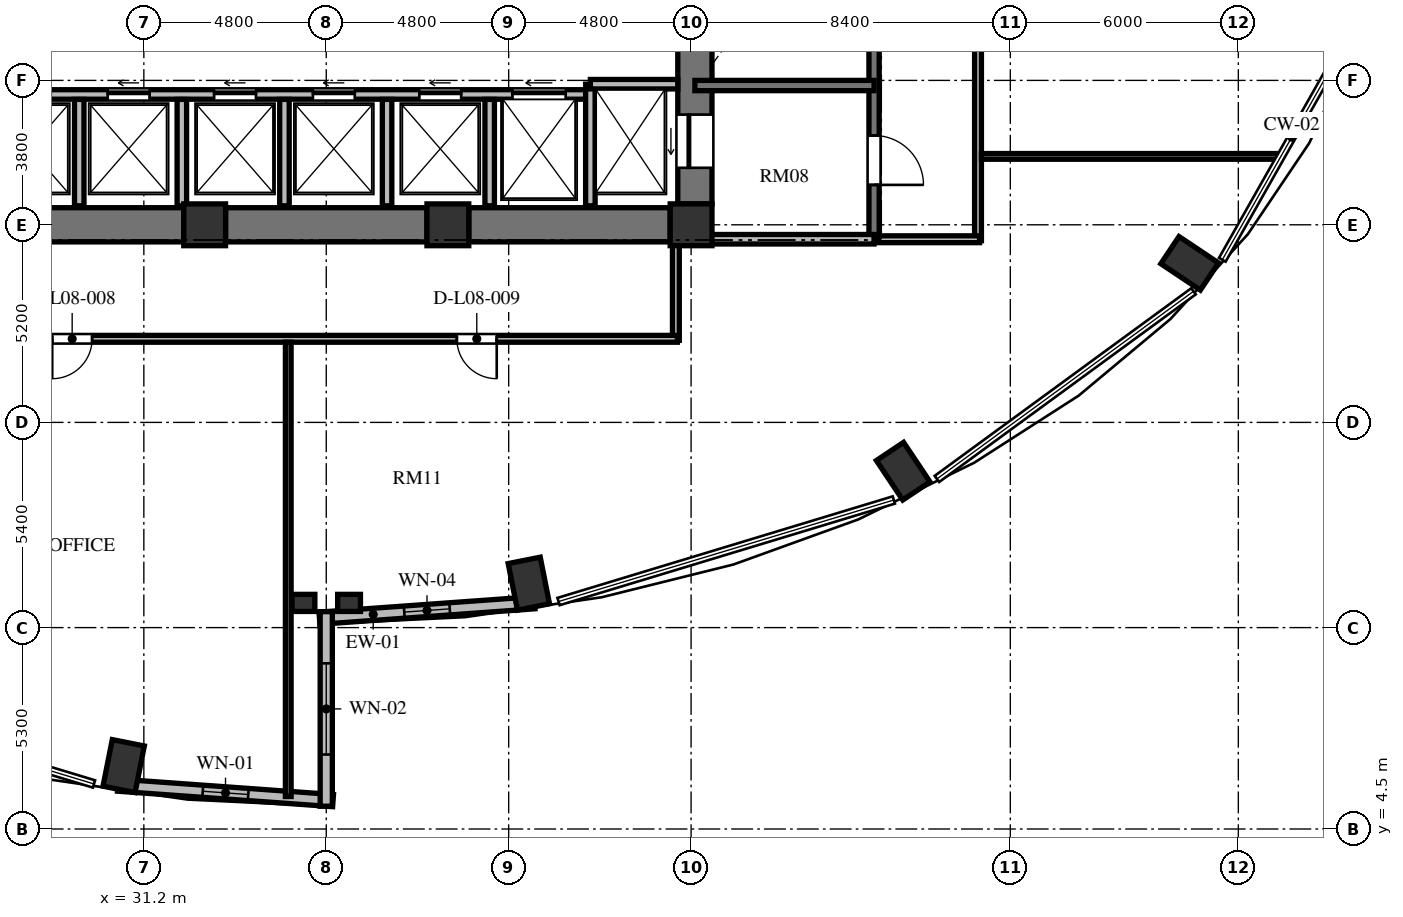
"""IFC4 building model, lengths in metres.
Left out: names, types, materials, properties, quantities, classifications, styles, units other than length and angle.
Written with IfcOpenShell. Run it as: python <this file> out.ifc"""

import sys

from ifc_helpers import new_model, si_unit, direction, frame, frame_2d, origin, origin_2d, place, context, subcontext, project, spatial, rectangle, extrude, element, fill, save


model = new_model("IFC4")
c1 = context("Model", 3, precision=1e-05, world=origin(), true_north=direction((0.0, 1.0)))
c2 = subcontext(c1, "Body", "Model", "MODEL_VIEW")
j1 = project(units=[si_unit("LENGTHUNIT", "METRE"), si_unit("PLANEANGLEUNIT", "RADIAN")], contexts=[c1])
p1 = place(None, origin())
s1 = spatial("IfcSite", under=j1, at=p1, CompositionType="ELEMENT")
p2 = place(p1, origin())
s2 = spatial("IfcBuilding", under=s1, at=p2, CompositionType="ELEMENT")
p3 = place(p2, frame((0.0, 0.0, 36.144)))
s3 = spatial("IfcBuildingStorey", under=s2, at=p3, CompositionType="ELEMENT", Elevation=36.144)
for number, where, z_axis, x_axis in (
    (1, (41.331, 10.956, 0.0), (0.0, 0.0, 1.0), (0.195, -0.981, 0.0)),
    (2, (51.181, 13.916, 0.0), (0.0, 0.0, 1.0), (0.556, -0.831, 0.0)),
    (3, (58.72, 19.386, 0.0), (0.0, 0.0, 1.0), (0.831, -0.556, 0.0)),
    (4, (30.669, 6.156, 0.0), (0.0, 0.0, 1.0), (-0.195, -0.981, 0.0)),
):
    element("IfcColumn", number, at=place(p3, frame(where, z_axis=z_axis, x_axis=x_axis)), inside=s3, PredefinedType="COLUMN", context=c2, shape_type="SweptSolid", body=[
        extrude(rectangle(XDim=1.25, YDim=0.86, at=origin_2d()), origin(), (0.0, 0.0, 1.0), 3.648),
    ])
for number, where, z_axis, x_axis in (
    (5, (32.8, 20.4, 0.0), (0.0, 0.0, 1.0), (1.0, 0.0, 0.0)),
    (6, (39.2, 20.4, 0.0), (0.0, 0.0, 1.0), (1.0, 0.0, 0.0)),
    (7, (45.6, 20.4, 0.0), (0.0, 0.0, 1.0), (1.0, 0.0, 0.0)),
):
    element("IfcColumn", number, at=place(p3, frame(where, z_axis=z_axis, x_axis=x_axis)), inside=s3, PredefinedType="COLUMN", context=c2, shape_type="SweptSolid", body=[
        extrude(rectangle(XDim=1.1, YDim=1.1, at=origin_2d()), origin(), (0.0, 0.0, 1.0), 3.648),
    ])
for number, where, z_axis, x_axis in (
    (8, (35.4, 10.45, 0.0), (0.0, 0.0, 1.0), (1.0, 0.0, 0.0)),
    (9, (36.6, 10.45, 0.0), (0.0, 0.0, 1.0), (1.0, 0.0, 0.0)),
):
    element("IfcColumn", number, at=place(p3, frame(where, z_axis=z_axis, x_axis=x_axis)), inside=s3, PredefinedType="PILASTER", context=c2, shape_type="SweptSolid", body=[
        extrude(rectangle(XDim=0.6, YDim=0.45, at=origin_2d()), origin(), (0.0, 0.0, 1.0), 3.648),
    ])
p4 = place(p3, frame((45.7, 20.95, 0.0), z_axis=(0.0, 0.0, 1.0), x_axis=(0.0, 1.0, 0.0)))
e10 = element("IfcWall", 10, at=p4, inside=s3, PredefinedType="SHEAR", context=c2, shape_type="SweptSolid", body=[
    extrude(rectangle(XDim=14.1, YDim=0.9, at=frame_2d((7.05, 0.0))), origin(), (0.0, 0.0, 1.0), 3.648),
])
p5 = place(p4, frame((11.75, 0.0, 0.0)))
e11 = element("IfcOpeningElement", 11, at=p5, cuts=e10, PredefinedType="OPENING", context=c2, shape_type="SweptSolid", body=[
    extrude(rectangle(XDim=1.4, YDim=2.3, at=frame_2d((0.7, 1.15))), frame((0.0, 0.46, 0.0), z_axis=(0.0, -1.0, 0.0), x_axis=(1.0, 0.0, 0.0)), (0.0, 0.0, 1.0), 0.92),
])
p6 = place(p4, frame((0.95, 0.0, 0.0)))
e12 = element("IfcOpeningElement", 12, at=p6, cuts=e10, PredefinedType="OPENING", context=c2, shape_type="SweptSolid", body=[
    extrude(rectangle(XDim=1.4, YDim=2.3, at=frame_2d((0.7, 1.15))), frame((0.0, 0.46, 0.0), z_axis=(0.0, -1.0, 0.0), x_axis=(1.0, 0.0, 0.0)), (0.0, 0.0, 1.0), 0.92),
])
p7 = place(p3, frame((26.95, 20.4, 0.0), z_axis=(0.0, 0.0, 1.0), x_axis=(1.0, 0.0, 0.0)))
e13 = element("IfcWall", 13, at=p7, inside=s3, PredefinedType="SHEAR", context=c2, shape_type="SweptSolid", body=[
    extrude(rectangle(XDim=5.3, YDim=0.9, at=frame_2d((2.65, 0.0))), origin(), (0.0, 0.0, 1.0), 3.648),
])
p8 = place(p3, frame((33.35, 20.4, 0.0), z_axis=(0.0, 0.0, 1.0), x_axis=(1.0, 0.0, 0.0)))
e14 = element("IfcWall", 14, at=p8, inside=s3, PredefinedType="SHEAR", context=c2, shape_type="SweptSolid", body=[
    extrude(rectangle(XDim=5.3, YDim=0.9, at=frame_2d((2.65, 0.0))), origin(), (0.0, 0.0, 1.0), 3.648),
])
p9 = place(p3, frame((39.75, 20.4, 0.0), z_axis=(0.0, 0.0, 1.0), x_axis=(1.0, 0.0, 0.0)))
e15 = element("IfcWall", 15, at=p9, inside=s3, PredefinedType="SHEAR", context=c2, shape_type="SweptSolid", body=[
    extrude(rectangle(XDim=5.3, YDim=0.9, at=frame_2d((2.65, 0.0))), origin(), (0.0, 0.0, 1.0), 3.648),
])
p10 = place(p3, frame((35.821, 10.047, 0.0), z_axis=(0.0, 0.0, 1.0), x_axis=(0.997422321809, 0.071754525696, 0.0)))
e16 = element("IfcWall", 16, at=p10, inside=s3, PredefinedType="SOLIDWALL", context=c2, shape_type="SweptSolid", body=[
    extrude(rectangle(XDim=5.675, YDim=0.32, at=frame_2d((2.838, 0.0))), origin(), (0.0, 0.0, 1.0), 3.428),
])
p11 = place(p10, frame((2.238, 0.0, 0.85)))
e17 = element("IfcOpeningElement", 17, at=p11, cuts=e16, PredefinedType="OPENING", context=c2, shape_type="SweptSolid", body=[
    extrude(rectangle(XDim=1.2, YDim=1.8, at=frame_2d((0.6, 0.9))), frame((0.0, 0.17, 0.0), z_axis=(0.0, -1.0, 0.0), x_axis=(1.0, 0.0, 0.0)), (0.0, 0.0, 1.0), 0.34),
])
p12 = place(p3, frame((30.519, 5.654, 0.0), z_axis=(0.0, 0.0, 1.0), x_axis=(0.997421878774, -0.071760683825, 0.0)))
e18 = element("IfcWall", 18, at=p12, inside=s3, PredefinedType="SOLIDWALL", context=c2, shape_type="SweptSolid", body=[
    extrude(rectangle(XDim=5.675, YDim=0.32, at=frame_2d((2.837, 0.0))), origin(), (0.0, 0.0, 1.0), 3.428),
])
p13 = place(p12, frame((2.237, 0.0, 0.85)))
e19 = element("IfcOpeningElement", 19, at=p13, cuts=e18, PredefinedType="OPENING", context=c2, shape_type="SweptSolid", body=[
    extrude(rectangle(XDim=1.2, YDim=2.2, at=frame_2d((0.6, 1.1))), frame((0.0, 0.17, 0.0), z_axis=(0.0, -1.0, 0.0), x_axis=(1.0, 0.0, 0.0)), (0.0, 0.0, 1.0), 0.34),
])
p14 = place(p3, frame((36.0, 5.1, 0.0), z_axis=(0.0, 0.0, 1.0), x_axis=(0.0, 1.0, 0.0)))
e20 = element("IfcWall", 20, at=p14, inside=s3, PredefinedType="SOLIDWALL", context=c2, shape_type="SweptSolid", body=[
    extrude(rectangle(XDim=5.12, YDim=0.32, at=frame_2d((2.56, 0.0))), origin(), (0.0, 0.0, 1.0), 3.428),
])
p15 = place(p14, frame((1.36, 0.0, 0.84)))
e21 = element("IfcOpeningElement", 21, at=p15, cuts=e20, PredefinedType="OPENING", context=c2, shape_type="SweptSolid", body=[
    extrude(rectangle(XDim=2.4, YDim=2.04, at=frame_2d((1.2, 1.02))), frame((0.0, 0.17, 0.0), z_axis=(0.0, -1.0, 0.0), x_axis=(1.0, 0.0, 0.0)), (0.0, 0.0, 1.0), 0.34),
])
p16 = place(p3, frame((26.75, 23.83, 0.0), z_axis=(0.0, 0.0, 1.0), x_axis=(1.0, 0.0, 0.0)))
e22 = element("IfcWall", 22, at=p16, inside=s3, PredefinedType="SOLIDWALL", context=c2, shape_type="SweptSolid", body=[
    extrude(rectangle(XDim=16.2, YDim=0.25, at=frame_2d((8.1, 0.0))), origin(), (0.0, 0.0, 1.0), 3.428),
])
p17 = place(p16, frame((0.9, 0.0, 0.0)))
e23 = element("IfcOpeningElement", 23, at=p17, cuts=e22, PredefinedType="OPENING", context=c2, shape_type="SweptSolid", body=[
    extrude(rectangle(XDim=1.1, YDim=2.2, at=frame_2d((0.55, 1.1))), frame((0.0, 0.135, 0.0), z_axis=(0.0, -1.0, 0.0), x_axis=(1.0, 0.0, 0.0)), (0.0, 0.0, 1.0), 0.27),
])
p18 = place(p16, frame((3.5, 0.0, 0.0)))
e24 = element("IfcOpeningElement", 24, at=p18, cuts=e22, PredefinedType="OPENING", context=c2, shape_type="SweptSolid", body=[
    extrude(rectangle(XDim=1.1, YDim=2.2, at=frame_2d((0.55, 1.1))), frame((0.0, 0.135, 0.0), z_axis=(0.0, -1.0, 0.0), x_axis=(1.0, 0.0, 0.0)), (0.0, 0.0, 1.0), 0.27),
])
p19 = place(p16, frame((6.3, 0.0, 0.0)))
e25 = element("IfcOpeningElement", 25, at=p19, cuts=e22, PredefinedType="OPENING", context=c2, shape_type="SweptSolid", body=[
    extrude(rectangle(XDim=1.1, YDim=2.2, at=frame_2d((0.55, 1.1))), frame((0.0, 0.135, 0.0), z_axis=(0.0, -1.0, 0.0), x_axis=(1.0, 0.0, 0.0)), (0.0, 0.0, 1.0), 0.27),
])
p20 = place(p16, frame((8.9, 0.0, 0.0)))
e26 = element("IfcOpeningElement", 26, at=p20, cuts=e22, PredefinedType="OPENING", context=c2, shape_type="SweptSolid", body=[
    extrude(rectangle(XDim=1.1, YDim=2.2, at=frame_2d((0.55, 1.1))), frame((0.0, 0.135, 0.0), z_axis=(0.0, -1.0, 0.0), x_axis=(1.0, 0.0, 0.0)), (0.0, 0.0, 1.0), 0.27),
])
p21 = place(p16, frame((11.7, 0.0, 0.0)))
e27 = element("IfcOpeningElement", 27, at=p21, cuts=e22, PredefinedType="OPENING", context=c2, shape_type="SweptSolid", body=[
    extrude(rectangle(XDim=1.1, YDim=2.2, at=frame_2d((0.55, 1.1))), frame((0.0, 0.135, 0.0), z_axis=(0.0, -1.0, 0.0), x_axis=(1.0, 0.0, 0.0)), (0.0, 0.0, 1.0), 0.27),
])
p22 = place(p16, frame((14.15, 0.0, 0.0)))
e28 = element("IfcOpeningElement", 28, at=p22, cuts=e22, PredefinedType="OPENING", context=c2, shape_type="SweptSolid", body=[
    extrude(rectangle(XDim=1.4, YDim=2.3, at=frame_2d((0.7, 1.15))), frame((0.0, 0.135, 0.0), z_axis=(0.0, -1.0, 0.0), x_axis=(1.0, 0.0, 0.0)), (0.0, 0.0, 1.0), 0.27),
])
p23 = place(p3, frame((42.95, 20.9, 0.0), z_axis=(0.0, 0.0, 1.0), x_axis=(0.0, 1.0, 0.0)))
e29 = element("IfcWall", 29, at=p23, inside=s3, PredefinedType="SOLIDWALL", context=c2, shape_type="SweptSolid", body=[
    extrude(rectangle(XDim=3.2, YDim=0.25, at=frame_2d((1.6, 0.0))), origin(), (0.0, 0.0, 1.0), 3.428),
])
p24 = place(p3, frame((42.95, 24.1, 0.0), z_axis=(0.0, 0.0, 1.0), x_axis=(1.0, 0.0, 0.0)))
e30 = element("IfcWall", 30, at=p24, inside=s3, PredefinedType="SOLIDWALL", context=c2, shape_type="SweptSolid", body=[
    extrude(rectangle(XDim=2.3, YDim=0.25, at=frame_2d((1.15, 0.0))), origin(), (0.0, 0.0, 1.0), 3.428),
])
for number, where, z_axis, x_axis in (
    (31, (29.5, 20.9, 0.0), (0.0, 0.0, 1.0), (0.0, 1.0, 0.0)),
    (32, (32.2, 20.9, 0.0), (0.0, 0.0, 1.0), (0.0, 1.0, 0.0)),
    (33, (34.9, 20.9, 0.0), (0.0, 0.0, 1.0), (0.0, 1.0, 0.0)),
    (34, (37.6, 20.9, 0.0), (0.0, 0.0, 1.0), (0.0, 1.0, 0.0)),
    (35, (40.3, 20.9, 0.0), (0.0, 0.0, 1.0), (0.0, 1.0, 0.0)),
):
    element("IfcWall", number, at=place(p3, frame(where, z_axis=z_axis, x_axis=x_axis)), inside=s3, PredefinedType="SOLIDWALL", context=c2, shape_type="SweptSolid", body=[
        extrude(rectangle(XDim=2.8, YDim=0.25, at=frame_2d((1.4, 0.0))), origin(), (0.0, 0.0, 1.0), 3.428),
    ])
p25 = place(p3, frame((50.415, 35.845, 0.0), z_axis=(0.0, 0.0, 1.0), x_axis=(0.0, -1.0, 0.0)))
e36 = element("IfcWall", 36, at=p25, inside=s3, PredefinedType="SHEAR", context=c2, shape_type="SweptSolid", body=[
    extrude(rectangle(XDim=15.825, YDim=0.27, at=frame_2d((7.913, 0.0))), origin(), (0.0, 0.0, 1.0), 3.648),
])
p26 = place(p25, frame((4.445, 0.0, 0.0)))
e37 = element("IfcOpeningElement", 37, at=p26, cuts=e36, PredefinedType="OPENING", context=c2, shape_type="SweptSolid", body=[
    extrude(rectangle(XDim=1.2, YDim=2.15, at=frame_2d((0.6, 1.075))), frame((0.0, 0.145, 0.0), z_axis=(0.0, -1.0, 0.0), x_axis=(1.0, 0.0, 0.0)), (0.0, 0.0, 1.0), 0.29),
])
p27 = place(p25, frame((1.295, 0.0, 0.0)))
e38 = element("IfcOpeningElement", 38, at=p27, cuts=e36, PredefinedType="OPENING", context=c2, shape_type="SweptSolid", body=[
    extrude(rectangle(XDim=1.3, YDim=2.2, at=frame_2d((0.65, 1.1))), frame((0.0, 0.145, 0.0), z_axis=(0.0, -1.0, 0.0), x_axis=(1.0, 0.0, 0.0)), (0.0, 0.0, 1.0), 0.29),
])
p28 = place(p25, frame((13.095, 0.0, 0.0)))
e39 = element("IfcOpeningElement", 39, at=p28, cuts=e36, PredefinedType="OPENING", context=c2, shape_type="SweptSolid", body=[
    extrude(rectangle(XDim=1.3, YDim=2.2, at=frame_2d((0.65, 1.1))), frame((0.0, 0.145, 0.0), z_axis=(0.0, -1.0, 0.0), x_axis=(1.0, 0.0, 0.0)), (0.0, 0.0, 1.0), 0.29),
])
p29 = place(p3, frame((45.7, 24.065, 0.0), z_axis=(0.0, 0.0, 1.0), x_axis=(1.0, 0.0, 0.0)))
e40 = element("IfcWall", 40, at=p29, inside=s3, PredefinedType="SHEAR", context=c2, shape_type="SweptSolid", body=[
    extrude(rectangle(XDim=4.715, YDim=0.27, at=frame_2d((2.357, 0.0))), origin(), (0.0, 0.0, 1.0), 3.648),
])
p30 = place(p3, frame((45.7, 20.02, 0.0), z_axis=(0.0, 0.0, 1.0), x_axis=(1.0, 0.0, 0.0)))
e41 = element("IfcWall", 41, at=p30, inside=s3, PredefinedType="SOLIDWALL", context=c2, shape_type="SweptSolid", body=[
    extrude(rectangle(XDim=4.715, YDim=0.25, at=frame_2d((2.357, 0.0))), origin(), (0.0, 0.0, 1.0), 2.813),
])
p31 = place(p3, frame((53.15, 26.64, 0.0), z_axis=(0.0, 0.0, 1.0), x_axis=(0.0, -1.0, 0.0)))
e42 = element("IfcWall", 42, at=p31, inside=s3, PredefinedType="PARTITIONING", context=c2, shape_type="SweptSolid", body=[
    extrude(rectangle(XDim=6.66, YDim=0.18, at=frame_2d((3.33, 0.0))), origin(), (0.0, 0.0, 1.0), 3.428),
])
p32 = place(p3, frame((53.19, 20.02, 0.0), z_axis=(0.0, 0.0, 1.0), x_axis=(-1.0, 0.0, 0.0)))
e43 = element("IfcWall", 43, at=p32, inside=s3, PredefinedType="PARTITIONING", context=c2, shape_type="SweptSolid", body=[
    extrude(rectangle(XDim=2.65, YDim=0.18, at=frame_2d((1.325, 0.0))), origin(), (0.0, 0.0, 1.0), 2.813),
])
p33 = place(p3, frame((45.2, 19.91, 0.0), z_axis=(0.0, 0.0, 1.0), x_axis=(0.0, -1.0, 0.0)))
e44 = element("IfcWall", 44, at=p33, inside=s3, PredefinedType="PARTITIONING", context=c2, shape_type="SweptSolid", body=[
    extrude(rectangle(XDim=2.55, YDim=0.18, at=frame_2d((1.275, 0.0))), origin(), (0.0, 0.0, 1.0), 3.428),
])
p34 = place(p3, frame((45.24, 17.4, 0.0), z_axis=(0.0, 0.0, 1.0), x_axis=(-1.0, 0.0, 0.0)))
e45 = element("IfcWall", 45, at=p34, inside=s3, PredefinedType="PARTITIONING", context=c2, shape_type="SweptSolid", body=[
    extrude(rectangle(XDim=21.93, YDim=0.18, at=frame_2d((10.965, 0.0))), origin(), (0.0, 0.0, 1.0), 3.053),
])
p35 = place(p34, frame((15.401, 0.0, 0.0)))
e46 = element("IfcOpeningElement", 46, at=p35, cuts=e45, PredefinedType="OPENING", context=c2, shape_type="SweptSolid", body=[
    extrude(rectangle(XDim=1.05, YDim=2.15, at=frame_2d((0.525, 1.075))), frame((0.0, 0.1, 0.0), z_axis=(0.0, -1.0, 0.0), x_axis=(1.0, 0.0, 0.0)), (0.0, 0.0, 1.0), 0.2),
])
p36 = place(p34, frame((4.754, 0.0, 0.0)))
e47 = element("IfcOpeningElement", 47, at=p36, cuts=e45, PredefinedType="OPENING", context=c2, shape_type="SweptSolid", body=[
    extrude(rectangle(XDim=1.05, YDim=2.15, at=frame_2d((0.525, 1.075))), frame((0.0, 0.1, 0.0), z_axis=(0.0, -1.0, 0.0), x_axis=(1.0, 0.0, 0.0)), (0.0, 0.0, 1.0), 0.2),
])
p37 = place(p3, frame((53.24, 22.2, 0.0), z_axis=(0.0, 0.0, 1.0), x_axis=(1.0, 0.0, 0.0)))
e48 = element("IfcWall", 48, at=p37, inside=s3, PredefinedType="PARTITIONING", context=c2, shape_type="SweptSolid", body=[
    extrude(rectangle(XDim=7.875, YDim=0.15, at=frame_2d((3.938, 0.0))), origin(), (0.0, 0.0, 1.0), 3.428),
])
p38 = place(p3, frame((35.0, 5.356, 0.0), z_axis=(0.0, 0.0, 1.0), x_axis=(0.0, 1.0, 0.0)))
e49 = element("IfcWall", 49, at=p38, inside=s3, PredefinedType="PARTITIONING", context=c2, shape_type="SweptSolid", body=[
    extrude(rectangle(XDim=11.954, YDim=0.15, at=frame_2d((5.977, 0.0))), origin(), (0.0, 0.0, 1.0), 3.428),
])
p39 = place(p11, origin())
e50 = element("IfcWindow", 50, at=p39, inside=s3, PartitioningType="SINGLE_PANEL", PredefinedType="WINDOW", context=c2, shape_type="SweptSolid", body=[
    extrude(rectangle(XDim=1.2, YDim=1.8, at=frame_2d((0.6, 0.9))), frame((0.0, 0.03, 0.0), z_axis=(0.0, -1.0, 0.0), x_axis=(1.0, 0.0, 0.0)), (0.0, 0.0, 1.0), 0.06),
])
fill(e17, e50)
p40 = place(p13, origin())
e51 = element("IfcWindow", 51, at=p40, inside=s3, PartitioningType="SINGLE_PANEL", PredefinedType="WINDOW", context=c2, shape_type="SweptSolid", body=[
    extrude(rectangle(XDim=1.2, YDim=2.2, at=frame_2d((0.6, 1.1))), frame((0.0, 0.03, 0.0), z_axis=(0.0, -1.0, 0.0), x_axis=(1.0, 0.0, 0.0)), (0.0, 0.0, 1.0), 0.06),
])
fill(e19, e51)
p41 = place(p15, origin())
e52 = element("IfcWindow", 52, at=p41, inside=s3, PartitioningType="SINGLE_PANEL", PredefinedType="WINDOW", context=c2, shape_type="SweptSolid", body=[
    extrude(rectangle(XDim=2.4, YDim=2.04, at=frame_2d((1.2, 1.02))), frame((0.0, 0.03, 0.0), z_axis=(0.0, -1.0, 0.0), x_axis=(1.0, 0.0, 0.0)), (0.0, 0.0, 1.0), 0.06),
])
fill(e21, e52)
p42 = place(p18, origin())
e53 = element("IfcDoor", 53, at=p42, inside=s3, OperationType="SLIDING_TO_LEFT", PredefinedType="DOOR", context=c2, shape_type="SweptSolid", body=[
    extrude(rectangle(XDim=1.1, YDim=2.2, at=frame_2d((0.55, 1.1))), frame((0.0, 0.025, 0.0), z_axis=(0.0, -1.0, 0.0), x_axis=(1.0, 0.0, 0.0)), (0.0, 0.0, 1.0), 0.05),
])
fill(e24, e53)
p43 = place(p19, origin())
e54 = element("IfcDoor", 54, at=p43, inside=s3, OperationType="SLIDING_TO_LEFT", PredefinedType="DOOR", context=c2, shape_type="SweptSolid", body=[
    extrude(rectangle(XDim=1.1, YDim=2.2, at=frame_2d((0.55, 1.1))), frame((0.0, 0.025, 0.0), z_axis=(0.0, -1.0, 0.0), x_axis=(1.0, 0.0, 0.0)), (0.0, 0.0, 1.0), 0.05),
])
fill(e25, e54)
p44 = place(p20, origin())
e55 = element("IfcDoor", 55, at=p44, inside=s3, OperationType="SLIDING_TO_LEFT", PredefinedType="DOOR", context=c2, shape_type="SweptSolid", body=[
    extrude(rectangle(XDim=1.1, YDim=2.2, at=frame_2d((0.55, 1.1))), frame((0.0, 0.025, 0.0), z_axis=(0.0, -1.0, 0.0), x_axis=(1.0, 0.0, 0.0)), (0.0, 0.0, 1.0), 0.05),
])
fill(e26, e55)
p45 = place(p21, origin())
e56 = element("IfcDoor", 56, at=p45, inside=s3, OperationType="SLIDING_TO_LEFT", PredefinedType="DOOR", context=c2, shape_type="SweptSolid", body=[
    extrude(rectangle(XDim=1.1, YDim=2.2, at=frame_2d((0.55, 1.1))), frame((0.0, 0.025, 0.0), z_axis=(0.0, -1.0, 0.0), x_axis=(1.0, 0.0, 0.0)), (0.0, 0.0, 1.0), 0.05),
])
fill(e27, e56)
p46 = place(p6, origin())
e57 = element("IfcDoor", 57, at=p46, inside=s3, OperationType="SLIDING_TO_LEFT", PredefinedType="DOOR", context=c2, shape_type="SweptSolid", body=[
    extrude(rectangle(XDim=1.4, YDim=2.3, at=frame_2d((0.7, 1.15))), frame((0.0, 0.025, 0.0), z_axis=(0.0, -1.0, 0.0), x_axis=(1.0, 0.0, 0.0)), (0.0, 0.0, 1.0), 0.05),
])
fill(e12, e57)
p47 = place(p22, origin())
e58 = element("IfcDoor", 58, at=p47, inside=s3, OperationType="SLIDING_TO_LEFT", PredefinedType="DOOR", context=c2, shape_type="SweptSolid", body=[
    extrude(rectangle(XDim=1.4, YDim=2.3, at=frame_2d((0.7, 1.15))), frame((0.0, 0.025, 0.0), z_axis=(0.0, -1.0, 0.0), x_axis=(1.0, 0.0, 0.0)), (0.0, 0.0, 1.0), 0.05),
])
fill(e28, e58)
p48 = place(p28, origin())
e59 = element("IfcDoor", 59, at=p48, inside=s3, OperationType="SINGLE_SWING_RIGHT", PredefinedType="DOOR", context=c2, shape_type="SweptSolid", body=[
    extrude(rectangle(XDim=1.3, YDim=2.2, at=frame_2d((0.65, 1.1))), frame((0.0, 0.025, 0.0), z_axis=(0.0, -1.0, 0.0), x_axis=(1.0, 0.0, 0.0)), (0.0, 0.0, 1.0), 0.05),
])
fill(e39, e59)
p49 = place(p35, origin())
e60 = element("IfcDoor", 60, at=p49, inside=s3, OperationType="SINGLE_SWING_RIGHT", PredefinedType="DOOR", context=c2, shape_type="SweptSolid", body=[
    extrude(rectangle(XDim=1.05, YDim=2.15, at=frame_2d((0.525, 1.075))), frame((0.0, 0.025, 0.0), z_axis=(0.0, -1.0, 0.0), x_axis=(1.0, 0.0, 0.0)), (0.0, 0.0, 1.0), 0.05),
])
fill(e46, e60)
p50 = place(p36, origin())
e61 = element("IfcDoor", 61, at=p50, inside=s3, OperationType="SINGLE_SWING_LEFT", PredefinedType="DOOR", context=c2, shape_type="SweptSolid", body=[
    extrude(rectangle(XDim=1.05, YDim=2.15, at=frame_2d((0.525, 1.075))), frame((0.0, 0.025, 0.0), z_axis=(0.0, -1.0, 0.0), x_axis=(1.0, 0.0, 0.0)), (0.0, 0.0, 1.0), 0.05),
])
fill(e47, e61)
save(model, sys.argv[1])
